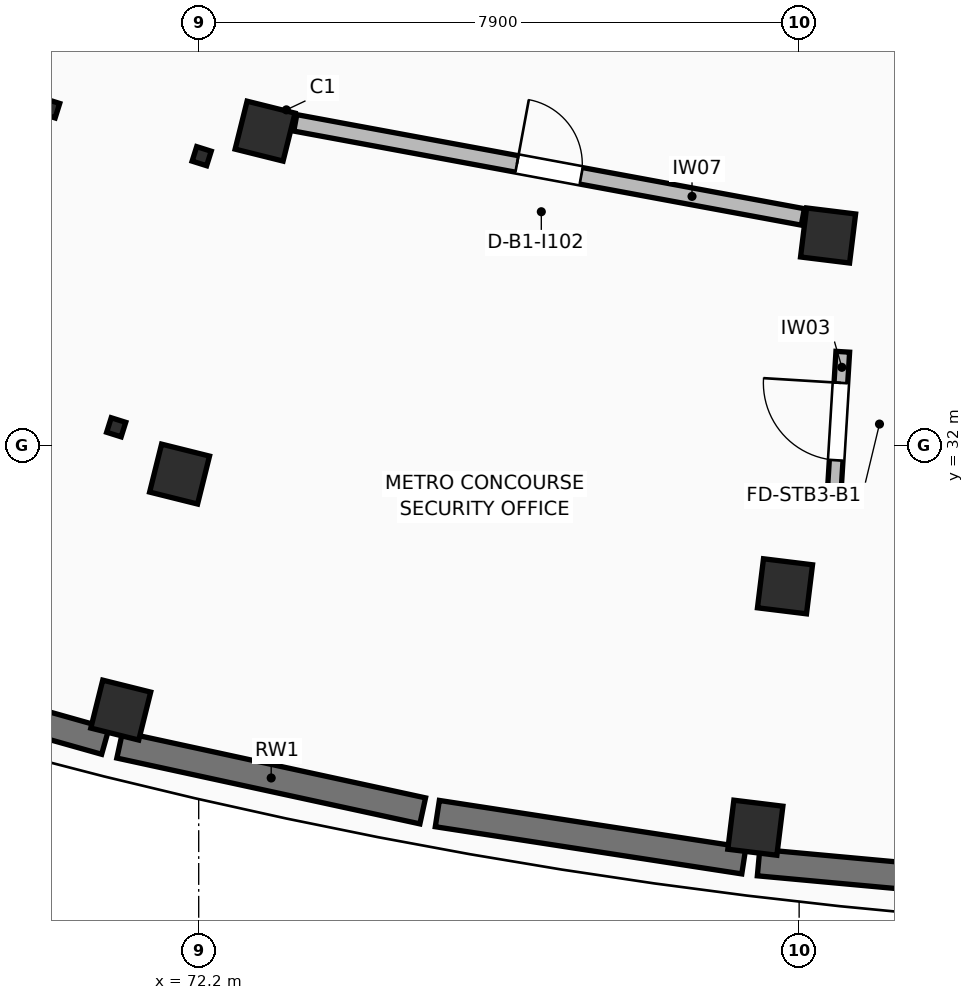
"""IFC4 building model, lengths in metres.
Left out: names, types, materials, properties, quantities, classifications, styles, units other than length and angle.
Written with IfcOpenShell. Run it as: python <this file> out.ifc"""

import sys

from ifc_helpers import new_model, si_unit, direction, frame, frame_2d, origin, origin_2d, place, context, subcontext, project, spatial, rectangle, hollow_rectangle, extrude, element, fill, save


model = new_model("IFC4")
c1 = context("Model", 3, precision=1e-05, world=origin(), true_north=direction((0.0, 1.0)))
c2 = subcontext(c1, "Body", "Model", "MODEL_VIEW")
j1 = project(units=[si_unit("LENGTHUNIT", "METRE"), si_unit("PLANEANGLEUNIT", "RADIAN")], contexts=[c1])
p1 = place(None, origin())
s1 = spatial("IfcSite", under=j1, at=p1, CompositionType="ELEMENT")
p2 = place(p1, origin())
s2 = spatial("IfcBuilding", under=s1, at=p2, CompositionType="ELEMENT")
p3 = place(p2, frame((0.0, 0.0, -4.08)))
s3 = spatial("IfcBuildingStorey", under=s2, at=p3, CompositionType="ELEMENT", Elevation=-4.08)
for number, where, z_axis, x_axis in (
    (1, (73.073, 36.133, 0.0), (0.0, 0.0, 1.0), (-0.242, -0.97, 0.0)),
    (2, (71.948, 31.621, 0.0), (0.0, 0.0, 1.0), (-0.242, -0.97, 0.0)),
    (3, (71.174, 28.516, 0.0), (0.0, 0.0, 1.0), (-0.242, -0.97, 0.0)),
    (4, (80.481, 34.76, 0.0), (0.0, 0.0, 1.0), (-0.122, -0.993, 0.0)),
    (5, (79.914, 30.145, 0.0), (0.0, 0.0, 1.0), (-0.122, -0.993, 0.0)),
    (6, (79.524, 26.969, 0.0), (0.0, 0.0, 1.0), (-0.122, -0.993, 0.0)),
):
    element("IfcColumn", number, at=place(p3, frame(where, z_axis=z_axis, x_axis=x_axis)), inside=s3, PredefinedType="COLUMN", context=c2, shape_type="SweptSolid", body=[
        extrude(rectangle(XDim=0.65, YDim=0.65, at=origin_2d()), origin(), (0.0, 0.0, 1.0), 4.08),
    ])
p4 = place(p3, frame((67.044, 29.21, 0.0), z_axis=(0.0, 0.0, 1.0), x_axis=(0.962457693032, -0.271431739343, 0.0)))
e7 = element("IfcWall", 7, at=p4, inside=s3, PredefinedType="USERDEFINED", context=c2, shape_type="SweptSolid", body=[
    extrude(rectangle(XDim=4.08, YDim=0.35, at=frame_2d((2.04, 0.0))), origin(), (0.0, 0.0, 1.0), 3.065),
])
p5 = place(p3, frame((71.16, 28.056, 0.0), z_axis=(0.0, 0.0, 1.0), x_axis=(0.977228720232, -0.212188662173, 0.0)))
e8 = element("IfcWall", 8, at=p5, inside=s3, PredefinedType="USERDEFINED", context=c2, shape_type="SweptSolid", body=[
    extrude(rectangle(XDim=4.08, YDim=0.35, at=frame_2d((2.04, 0.0))), origin(), (0.0, 0.0, 1.0), 3.065),
])
p6 = place(p3, frame((75.34, 27.154, 0.0), z_axis=(0.0, 0.0, 1.0), x_axis=(0.988363394791, -0.152111143038, 0.0)))
e9 = element("IfcWall", 9, at=p6, inside=s3, PredefinedType="USERDEFINED", context=c2, shape_type="SweptSolid", body=[
    extrude(rectangle(XDim=4.08, YDim=0.35, at=frame_2d((2.04, 0.0))), origin(), (0.0, 0.0, 1.0), 3.065),
])
p7 = place(p3, frame((79.566, 26.51, 0.0), z_axis=(0.0, 0.0, 1.0), x_axis=(0.995805936061, -0.091490642725, 0.0)))
e10 = element("IfcWall", 10, at=p7, inside=s3, PredefinedType="USERDEFINED", context=c2, shape_type="SweptSolid", body=[
    extrude(rectangle(XDim=4.08, YDim=0.35, at=frame_2d((2.04, 0.0))), origin(), (0.0, 0.0, 1.0), 3.065),
])
p8 = place(p3, frame((80.562, 31.394, 0.0), z_axis=(0.0, 0.0, 1.0), x_axis=(0.06103183268, 0.998135820117, 0.0)))
e11 = element("IfcWall", 11, at=p8, inside=s3, PredefinedType="STANDARD", context=c2, shape_type="SweptSolid", body=[
    extrude(rectangle(XDim=1.84, YDim=0.18, at=frame_2d((0.92, 0.0))), origin(), (0.0, 0.0, 1.0), 2.72),
])
p9 = place(p8, frame((0.41, 0.0, 0.0)))
e12 = element("IfcOpeningElement", 12, at=p9, cuts=e11, PredefinedType="OPENING", context=c2, shape_type="SweptSolid", body=[
    extrude(rectangle(XDim=1.02, YDim=2.16, at=frame_2d((0.51, 1.08))), frame((0.0, 0.1, 0.0), z_axis=(0.0, -1.0, 0.0), x_axis=(1.0, 0.0, 0.0)), (0.0, 0.0, 1.0), 0.2),
])
for number, where, z_axis, x_axis in (
    (13, (70.246, 36.432, 0.0), (0.0, 0.0, 1.0), (0.954, -0.301, 0.0)),
    (14, (71.115, 32.236, 0.0), (0.0, 0.0, 1.0), (0.954, -0.301, 0.0)),
    (15, (72.239, 35.803, 0.0), (0.0, 0.0, 1.0), (0.954, -0.301, 0.0)),
):
    element("IfcColumn", number, at=place(p3, frame(where, z_axis=z_axis, x_axis=x_axis)), inside=s3, PredefinedType="COLUMN", context=c2, shape_type="SweptSolid", body=[
        extrude(hollow_rectangle(XDim=0.2, YDim=0.2, WallThickness=0.01, InnerFilletRadius=0.01, OuterFilletRadius=0.02, at=origin_2d()), origin(), (0.0, 0.0, 1.0), 4.08),
    ])
p10 = place(p3, frame((73.471, 36.242, 0.0), z_axis=(0.0, 0.0, 1.0), x_axis=(0.983257442509, -0.182221847619, 0.0)))
e16 = element("IfcWall", 16, at=p10, inside=s3, PredefinedType="STANDARD", context=c2, shape_type="SweptSolid", body=[
    extrude(rectangle(XDim=6.792, YDim=0.22, at=frame_2d((3.396, 0.0))), origin(), (0.0, 0.0, 1.0), 2.72),
])
p11 = place(p10, frame((2.966, 0.0, 0.0)))
e17 = element("IfcOpeningElement", 17, at=p11, cuts=e16, PredefinedType="OPENING", context=c2, shape_type="SweptSolid", body=[
    extrude(rectangle(XDim=0.86, YDim=2.18, at=frame_2d((0.43, 1.09))), frame((0.0, 0.12, 0.0), z_axis=(0.0, -1.0, 0.0), x_axis=(1.0, 0.0, 0.0)), (0.0, 0.0, 1.0), 0.24),
])
p12 = place(p9, frame((1.02, 0.0, 0.0), z_axis=(0.0, 0.0, 1.0), x_axis=(-1.0, 0.0, 0.0)))
e18 = element("IfcDoor", 18, at=p12, inside=s3, OperationType="SINGLE_SWING_RIGHT", PredefinedType="DOOR", context=c2, shape_type="SweptSolid", body=[
    extrude(rectangle(XDim=1.02, YDim=2.16, at=frame_2d((0.51, 1.08))), frame((0.0, 0.025, 0.0), z_axis=(0.0, -1.0, 0.0), x_axis=(1.0, 0.0, 0.0)), (0.0, 0.0, 1.0), 0.05),
])
fill(e12, e18)
p13 = place(p11, origin())
e19 = element("IfcDoor", 19, at=p13, inside=s3, OperationType="SINGLE_SWING_LEFT", PredefinedType="DOOR", context=c2, shape_type="SweptSolid", body=[
    extrude(rectangle(XDim=0.86, YDim=2.18, at=frame_2d((0.43, 1.09))), frame((0.0, 0.025, 0.0), z_axis=(0.0, -1.0, 0.0), x_axis=(1.0, 0.0, 0.0)), (0.0, 0.0, 1.0), 0.05),
])
fill(e17, e19)
save(model, sys.argv[1])
